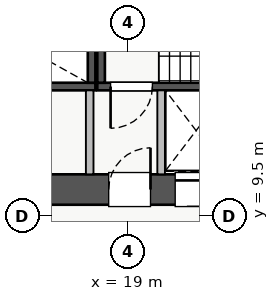
"""IFC4 building model, lengths in metres.
Left out: names, types, materials, properties, quantities, classifications, styles, units other than length and angle.
Written with IfcOpenShell. Run it as: python <this file> out.ifc"""

import sys

from ifc_helpers import new_model, si_unit, direction, frame, frame_2d, origin, place, context, subcontext, project, spatial, rectangle, extrude, source, transform, mapped, element, fill, save


model = new_model("IFC4")
c1 = context("Model", 3, precision=1e-05, world=origin(), true_north=direction((0.0, 1.0)))
c2 = subcontext(c1, "Body", "Model", "MODEL_VIEW")
j1 = project(units=[si_unit("LENGTHUNIT", "METRE"), si_unit("PLANEANGLEUNIT", "RADIAN")], contexts=[c1])
p1 = place(None, origin())
s1 = spatial("IfcSite", under=j1, at=p1, CompositionType="ELEMENT")
p2 = place(p1, origin())
s2 = spatial("IfcBuilding", under=s1, at=p2, CompositionType="ELEMENT")
p3 = place(p2, frame((0.0, 0.0, 60.0)))
s3 = spatial("IfcBuildingStorey", under=s2, at=p3, CompositionType="ELEMENT", Elevation=60.0)
p4 = place(p3, frame((19.88, 12.8, 0.0), z_axis=(0.0, 0.0, 1.0), x_axis=(1.0, 0.0, 0.0)))
e1 = element("IfcWall", 1, at=p4, inside=s3, PredefinedType="SHEAR", context=c2, shape_type="SweptSolid", body=[
    extrude(rectangle(XDim=1.87, YDim=0.18, at=frame_2d((0.935, 0.0))), origin(), (0.0, 0.0, 1.0), 3.07),
])
p5 = place(p3, frame((11.0, 12.91, 0.0), z_axis=(0.0, 0.0, 1.0), x_axis=(1.0, 0.0, 0.0)))
e2 = element("IfcWall", 2, at=p5, inside=s3, PredefinedType="SHEAR", context=c2, shape_type="SweptSolid", body=[
    extrude(rectangle(XDim=7.15, YDim=0.2, at=frame_2d((3.575, 0.0))), origin(), (0.0, 0.0, 1.0), 3.25),
])
p6 = place(p5, frame((0.35, 0.0, 0.0)))
e3 = element("IfcOpeningElement", 3, at=p6, cuts=e2, PredefinedType="OPENING", context=c2, shape_type="SweptSolid", body=[
    extrude(rectangle(XDim=1.1, YDim=2.05, at=frame_2d((0.55, 1.025))), frame((0.0, 0.11, 0.0), z_axis=(0.0, -1.0, 0.0), x_axis=(1.0, 0.0, 0.0)), (0.0, 0.0, 1.0), 0.22),
])
p7 = place(p3, frame((18.05, 13.01, 0.0), z_axis=(0.0, 0.0, 1.0), x_axis=(0.0, 1.0, 0.0)))
e4 = element("IfcWall", 4, at=p7, inside=s3, PredefinedType="SHEAR", context=c2, shape_type="SweptSolid", body=[
    extrude(rectangle(XDim=2.94, YDim=0.2, at=frame_2d((1.47, 0.0))), origin(), (0.0, 0.0, 1.0), 3.25),
])
p8 = place(p3, frame((18.2, 12.91, 0.0), z_axis=(0.0, 0.0, 1.0), x_axis=(1.0, 0.0, 0.0)))
e5 = element("IfcWall", 5, at=p8, inside=s3, PredefinedType="SHEAR", context=c2, shape_type="SweptSolid", body=[
    extrude(rectangle(XDim=7.15, YDim=0.2, at=frame_2d((3.575, 0.0))), origin(), (0.0, 0.0, 1.0), 3.25),
])
p9 = place(p8, frame((0.35, 0.0, 0.0)))
e6 = element("IfcOpeningElement", 6, at=p9, cuts=e5, PredefinedType="OPENING", context=c2, shape_type="SweptSolid", body=[
    extrude(rectangle(XDim=1.1, YDim=2.05, at=frame_2d((0.55, 1.025))), frame((0.0, 0.11, 0.0), z_axis=(0.0, -1.0, 0.0), x_axis=(1.0, 0.0, 0.0)), (0.0, 0.0, 1.0), 0.22),
])
p10 = place(p3, frame((18.3, 13.01, 0.0), z_axis=(0.0, 0.0, 1.0), x_axis=(0.0, 1.0, 0.0)))
e7 = element("IfcWall", 7, at=p10, inside=s3, PredefinedType="SHEAR", context=c2, shape_type="SweptSolid", body=[
    extrude(rectangle(XDim=2.94, YDim=0.2, at=frame_2d((1.47, 0.0))), origin(), (0.0, 0.0, 1.0), 3.25),
])
p11 = place(p3, frame((10.2, 10.2, 0.0), z_axis=(0.0, 0.0, 1.0), x_axis=(1.0, 0.0, 0.0)))
e8 = element("IfcWall", 8, at=p11, inside=s3, PredefinedType="SHEAR", context=c2, shape_type="SweptSolid", body=[
    extrude(rectangle(XDim=17.6, YDim=0.8, at=frame_2d((8.8, 0.0))), origin(), (0.0, 0.0, 1.0), 3.25),
])
p12 = place(p11, frame((1.15, 0.0, 0.0)))
e9 = element("IfcOpeningElement", 9, at=p12, cuts=e8, PredefinedType="OPENING", context=c2, shape_type="SweptSolid", body=[
    extrude(rectangle(XDim=1.1, YDim=2.05, at=frame_2d((0.55, 1.025))), frame((0.0, 0.41, 0.0), z_axis=(0.0, -1.0, 0.0), x_axis=(1.0, 0.0, 0.0)), (0.0, 0.0, 1.0), 0.82),
])
p13 = place(p11, frame((8.3, 0.0, 0.0)))
e10 = element("IfcOpeningElement", 10, at=p13, cuts=e8, PredefinedType="OPENING", context=c2, shape_type="SweptSolid", body=[
    extrude(rectangle(XDim=1.1, YDim=2.05, at=frame_2d((0.55, 1.025))), frame((0.0, 0.41, 0.0), z_axis=(0.0, -1.0, 0.0), x_axis=(1.0, 0.0, 0.0)), (0.0, 0.0, 1.0), 0.82),
])
p14 = place(p11, frame((10.05, 0.0, 0.0)))
e11 = element("IfcOpeningElement", 11, at=p14, cuts=e8, PredefinedType="OPENING", context=c2, shape_type="SweptSolid", body=[
    extrude(rectangle(XDim=1.1, YDim=2.05, at=frame_2d((0.55, 1.025))), frame((0.0, 0.41, 0.0), z_axis=(0.0, -1.0, 0.0), x_axis=(1.0, 0.0, 0.0)), (0.0, 0.0, 1.0), 0.82),
])
p15 = place(p11, frame((14.74, 0.0, 0.0)))
e12 = element("IfcOpeningElement", 12, at=p15, cuts=e8, PredefinedType="OPENING", context=c2, shape_type="SweptSolid", body=[
    extrude(rectangle(XDim=1.0, YDim=2.05, at=frame_2d((0.5, 1.025))), frame((0.0, 0.41, 0.0), z_axis=(0.0, -1.0, 0.0), x_axis=(1.0, 0.0, 0.0)), (0.0, 0.0, 1.0), 0.82),
])
p16 = place(p11, frame((12.585, 0.0, 0.0)))
e13 = element("IfcOpeningElement", 13, at=p16, cuts=e8, PredefinedType="OPENING", context=c2, shape_type="SweptSolid", body=[
    extrude(rectangle(XDim=1.0, YDim=2.05, at=frame_2d((0.5, 1.025))), frame((0.0, 0.41, 0.0), z_axis=(0.0, -1.0, 0.0), x_axis=(1.0, 0.0, 0.0)), (0.0, 0.0, 1.0), 0.82),
])
for number, where, z_axis, x_axis in (
    (14, (18.0, 10.6, 0.0), (0.0, 0.0, 1.0), (0.0, 1.0, 0.0)),
    (15, (19.88, 10.6, 0.0), (0.0, 0.0, 1.0), (0.0, 1.0, 0.0)),
):
    element("IfcWall", number, at=place(p3, frame(where, z_axis=z_axis, x_axis=x_axis)), inside=s3, PredefinedType="PARTITIONING", context=c2, shape_type="SweptSolid", body=[
        extrude(rectangle(XDim=2.21, YDim=0.2, at=frame_2d((1.105, 0.0))), origin(), (0.0, 0.0, 1.0), 3.07),
    ])
m1 = source(origin(), c2, "Body", "SweptSolid", [
    extrude(rectangle(XDim=1.1, YDim=2.05, at=frame_2d((0.55, 1.025))), frame((0.0, 0.025, 0.0), z_axis=(0.0, -1.0, 0.0), x_axis=(1.0, 0.0, 0.0)), (0.0, 0.0, 1.0), 0.05),
])
p17 = place(p13, origin())
e16 = element("IfcDoor", 16, at=p17, inside=s3, OperationType="SINGLE_SWING_RIGHT", PredefinedType="DOOR", context=c2, shape_type="MappedRepresentation", body=[
    mapped(m1, transform((0.0, 0.0, 0.0), x_axis=(1.0, 0.0, 0.0), y_axis=(0.0, 1.0, 0.0), z_axis=(0.0, 0.0, 1.0), scale=1.0)),
])
fill(e10, e16)
p18 = place(p9, frame((1.1, 0.0, 0.0), z_axis=(0.0, 0.0, 1.0), x_axis=(-1.0, 0.0, 0.0)))
e17 = element("IfcDoor", 17, at=p18, inside=s3, OperationType="SINGLE_SWING_LEFT", PredefinedType="DOOR", context=c2, shape_type="MappedRepresentation", body=[
    mapped(m1, transform((0.0, 0.0, 0.0), x_axis=(1.0, 0.0, 0.0), y_axis=(0.0, 1.0, 0.0), z_axis=(0.0, 0.0, 1.0), scale=1.0)),
])
fill(e6, e17)
p19 = place(p14, origin())
e18 = element("IfcDoor", 18, at=p19, inside=s3, OperationType="SLIDING_TO_RIGHT", PredefinedType="DOOR", context=c2, shape_type="MappedRepresentation", body=[
    mapped(m1, transform((0.0, 0.0, 0.0), x_axis=(1.0, 0.0, 0.0), y_axis=(0.0, 1.0, 0.0), z_axis=(0.0, 0.0, 1.0), scale=1.0)),
])
fill(e11, e18)
save(model, sys.argv[1])
